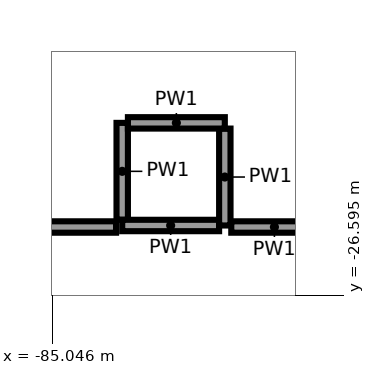
"""IFC4 building model, lengths in metres.
Left out: names, types, materials, properties, quantities, classifications, styles, units other than length and angle.
Written with IfcOpenShell. Run it as: python <this file> out.ifc"""

import sys

from ifc_helpers import new_model, si_unit, direction, frame, frame_2d, origin, place, context, subcontext, project, spatial, rectangle, extrude, element, save


model = new_model("IFC4")
c1 = context("Model", 3, precision=1e-05, world=origin(), true_north=direction((0.0, 1.0)))
c2 = subcontext(c1, "Body", "Model", "MODEL_VIEW")
j1 = project(units=[si_unit("LENGTHUNIT", "METRE"), si_unit("PLANEANGLEUNIT", "RADIAN")], contexts=[c1])
p1 = place(None, origin())
s1 = spatial("IfcSite", under=j1, at=p1, CompositionType="ELEMENT")
p2 = place(p1, origin())
s2 = spatial("IfcBuilding", under=s1, at=p2, CompositionType="ELEMENT")
p3 = place(p2, frame((0.0, 0.0, 6.5)))
s3 = spatial("IfcBuildingStorey", under=s2, at=p3, CompositionType="ELEMENT", Elevation=6.5)
p4 = place(p3, frame((-84.125, -24.325, 0.0), z_axis=(0.0, 0.0, 1.0), x_axis=(0.0, -1.0, 0.0)))
e1 = element("IfcWall", 1, at=p4, inside=s3, PredefinedType="PARTITIONING", context=c2, shape_type="SweptSolid", body=[
    extrude(rectangle(XDim=1.275, YDim=0.15, at=frame_2d((0.638, 0.0))), origin(), (0.0, 0.0, 1.0), 5.15),
])
p5 = place(p3, frame((-84.125, -25.675, 0.0), z_axis=(0.0, 0.0, 1.0), x_axis=(1.0, 0.0, 0.0)))
e2 = element("IfcWall", 2, at=p5, inside=s3, PredefinedType="PARTITIONING", context=c2, shape_type="SweptSolid", body=[
    extrude(rectangle(XDim=1.275, YDim=0.15, at=frame_2d((0.637, 0.0))), origin(), (0.0, 0.0, 1.0), 5.15),
])
for number, where, z_axis, x_axis in (
    (3, (-82.775, -25.675, 0.0), (0.0, 0.0, 1.0), (0.0, 1.0, 0.0)),
    (4, (-82.775, -24.325, 0.0), (0.0, 0.0, 1.0), (-1.0, 0.0, 0.0)),
):
    element("IfcWall", number, at=place(p3, frame(where, z_axis=z_axis, x_axis=x_axis)), inside=s3, PredefinedType="PARTITIONING", context=c2, shape_type="SweptSolid", body=[
        extrude(rectangle(XDim=1.275, YDim=0.15, at=frame_2d((0.638, 0.0))), origin(), (0.0, 0.0, 1.0), 5.15),
    ])
p6 = place(p3, frame((-87.909, -25.695, 0.0), z_axis=(0.0, 0.0, 1.0), x_axis=(1.0, 0.0, 0.0)))
e5 = element("IfcWall", 5, at=p6, inside=s3, PredefinedType="PARTITIONING", context=c2, shape_type="SweptSolid", body=[
    extrude(rectangle(XDim=3.704, YDim=0.15, at=frame_2d((1.852, 0.0))), origin(), (0.0, 0.0, 1.0), 4.05),
])
p7 = place(p6, frame((0.65, 0.0, 0.0)))
e6 = element("IfcOpeningElement", 6, at=p7, cuts=e5, PredefinedType="OPENING", context=c2, shape_type="SweptSolid", body=[
    extrude(rectangle(XDim=1.8, YDim=2.1, at=frame_2d((0.9, 1.05))), frame((0.0, 0.085, 0.0), z_axis=(0.0, -1.0, 0.0), x_axis=(1.0, 0.0, 0.0)), (0.0, 0.0, 1.0), 0.17),
])
p8 = place(p3, frame((-82.69, -25.695, 0.0), z_axis=(0.0, 0.0, 1.0), x_axis=(1.0, 0.0, 0.0)))
e7 = element("IfcWall", 7, at=p8, inside=s3, PredefinedType="PARTITIONING", context=c2, shape_type="SweptSolid", body=[
    extrude(rectangle(XDim=1.135, YDim=0.15, at=frame_2d((0.567, 0.0))), origin(), (0.0, 0.0, 1.0), 5.15),
])
save(model, sys.argv[1])
